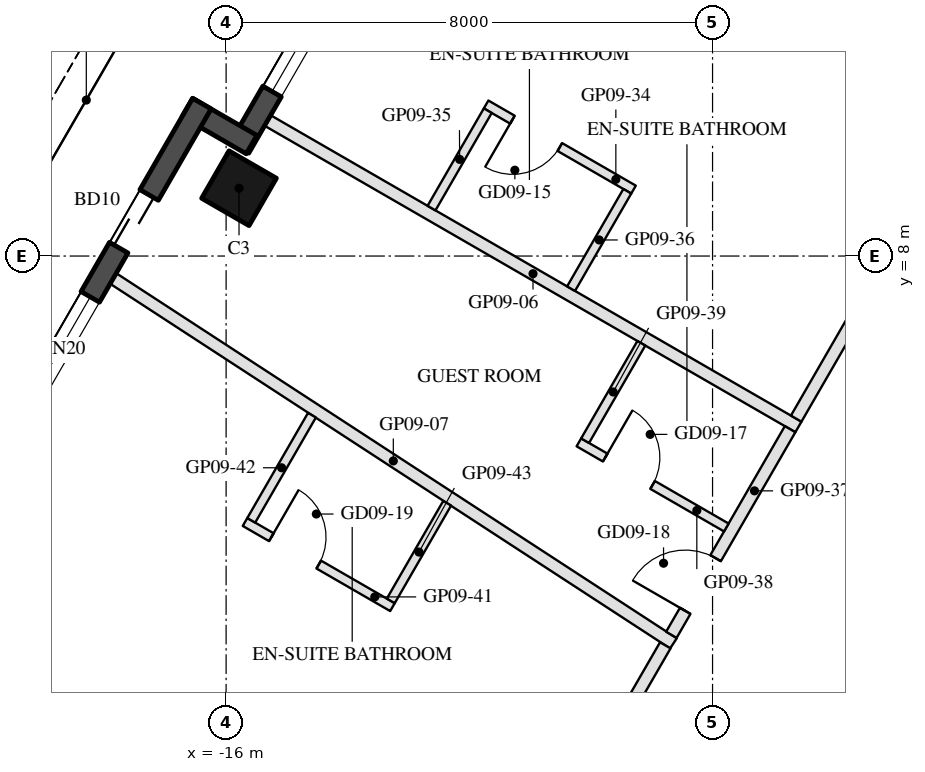
"""IFC4 building model, lengths in metres.
Left out: names, types, materials, properties, quantities, classifications, styles, units other than length and angle.
Written with IfcOpenShell. Run it as: python <this file> out.ifc"""

import sys

from ifc_helpers import new_model, si_unit, direction, frame, frame_2d, origin, origin_2d, place, context, subcontext, project, spatial, rectangle, hollow_rectangle, extrude, element, fill, save


model = new_model("IFC4")
c1 = context("Model", 3, precision=1e-05, world=origin(), true_north=direction((0.0, 1.0)))
c2 = subcontext(c1, "Body", "Model", "MODEL_VIEW")
j1 = project(units=[si_unit("LENGTHUNIT", "METRE"), si_unit("PLANEANGLEUNIT", "RADIAN")], contexts=[c1])
p1 = place(None, origin())
s1 = spatial("IfcSite", under=j1, at=p1, CompositionType="ELEMENT")
p2 = place(p1, origin())
s2 = spatial("IfcBuilding", under=s1, at=p2, CompositionType="ELEMENT")
p3 = place(p2, frame((0.0, 0.0, 109.4)))
s3 = spatial("IfcBuildingStorey", under=s2, at=p3, CompositionType="ELEMENT", Elevation=109.4)
p4 = place(p3, frame((-15.788, 9.115, 0.0), z_axis=(0.0, 0.0, 1.0), x_axis=(0.5, 0.866025403784, 0.0)))
e1 = element("IfcColumn", 1, at=p4, inside=s3, PredefinedType="COLUMN", context=c2, shape_type="SweptSolid", body=[
    extrude(hollow_rectangle(XDim=0.9, YDim=0.9, WallThickness=0.04, at=origin_2d()), origin(), (0.0, 0.0, 1.0), 3.7),
])
p5 = place(p3, frame((-12.409, 15.617, 0.0), z_axis=(0.0, 0.0, 1.0), x_axis=(-0.500003597184, -0.866023326939, 0.0)))
e2 = element("IfcWall", 2, at=p5, inside=s3, PredefinedType="SOLIDWALL", context=c2, shape_type="SweptSolid", body=[
    extrude(rectangle(XDim=6.74, YDim=0.35, at=frame_2d((3.37, 0.0))), origin(), (0.0, 0.0, 1.0), 3.55),
])
p6 = place(p5, frame((0.77, 0.0, 0.3)))
e3 = element("IfcOpeningElement", 3, at=p6, cuts=e2, PredefinedType="OPENING", context=c2, shape_type="SweptSolid", body=[
    extrude(rectangle(XDim=2.3, YDim=2.65, at=frame_2d((1.15, 1.325))), frame((0.0, 0.185, 0.0), z_axis=(0.0, -1.0, 0.0), x_axis=(1.0, 0.0, 0.0)), (0.0, 0.0, 1.0), 0.37),
])
p7 = place(p5, frame((3.37, 0.0, 0.3)))
e4 = element("IfcOpeningElement", 4, at=p7, cuts=e2, PredefinedType="OPENING", context=c2, shape_type="SweptSolid", body=[
    extrude(rectangle(XDim=2.3, YDim=2.65, at=frame_2d((1.15, 1.325))), frame((0.0, 0.185, 0.0), z_axis=(0.0, -1.0, 0.0), x_axis=(1.0, 0.0, 0.0)), (0.0, 0.0, 1.0), 0.37),
])
p8 = place(p3, frame((-15.581, 9.833, 0.0), z_axis=(0.0, 0.0, 1.0), x_axis=(-0.866055662726, 0.499947586314, 0.0)))
e5 = element("IfcWall", 5, at=p8, inside=s3, PredefinedType="SOLIDWALL", context=c2, shape_type="SweptSolid", body=[
    extrude(rectangle(XDim=1.22, YDim=0.35, at=frame_2d((0.61, 0.0))), origin(), (0.0, 0.0, 1.0), 3.55),
])
p9 = place(p3, frame((-16.398, 10.507, 0.0), z_axis=(0.0, 0.0, 1.0), x_axis=(-0.499999142773, -0.866025898704, 0.0)))
e6 = element("IfcWall", 6, at=p9, inside=s3, PredefinedType="SOLIDWALL", context=c2, shape_type="SweptSolid", body=[
    extrude(rectangle(XDim=9.7, YDim=0.35, at=frame_2d((4.85, 0.0))), origin(), (0.0, 0.0, 1.0), 3.55),
])
p10 = place(p9, frame((1.735, 0.0, 0.0)))
e7 = element("IfcOpeningElement", 7, at=p10, cuts=e6, PredefinedType="OPENING", context=c2, shape_type="SweptSolid", body=[
    extrude(rectangle(XDim=1.0, YDim=2.4, at=frame_2d((0.5, 1.2))), frame((0.0, 0.185, 0.0), z_axis=(0.0, -1.0, 0.0), x_axis=(1.0, 0.0, 0.0)), (0.0, 0.0, 1.0), 0.37),
])
p11 = place(p9, frame((3.67, 0.0, 0.3)))
e8 = element("IfcOpeningElement", 8, at=p11, cuts=e6, PredefinedType="OPENING", context=c2, shape_type="SweptSolid", body=[
    extrude(rectangle(XDim=2.0, YDim=2.65, at=frame_2d((1.0, 1.325))), frame((0.0, 0.185, 0.0), z_axis=(0.0, -1.0, 0.0), x_axis=(1.0, 0.0, 0.0)), (0.0, 0.0, 1.0), 0.37),
])
p12 = place(p9, frame((5.97, 0.0, 0.3)))
e9 = element("IfcOpeningElement", 9, at=p12, cuts=e6, PredefinedType="OPENING", context=c2, shape_type="SweptSolid", body=[
    extrude(rectangle(XDim=2.0, YDim=2.65, at=frame_2d((1.0, 1.325))), frame((0.0, 0.185, 0.0), z_axis=(0.0, -1.0, 0.0), x_axis=(1.0, 0.0, 0.0)), (0.0, 0.0, 1.0), 0.37),
])
p13 = place(p3, frame((-15.317, 10.229, 0.0), z_axis=(0.0, 0.0, 1.0), x_axis=(0.866022637375, -0.500004791531, 0.0)))
e10 = element("IfcWall", 10, at=p13, inside=s3, PredefinedType="PARTITIONING", context=c2, shape_type="SweptSolid", body=[
    extrude(rectangle(XDim=10.08, YDim=0.2, at=frame_2d((5.04, 0.0))), origin(), (0.0, 0.0, 1.0), 2.96),
])
p14 = place(p3, frame((-17.857, 7.631, 0.0), z_axis=(0.0, 0.0, 1.0), x_axis=(0.837909060234, -0.545809863211, 0.0)))
e11 = element("IfcWall", 11, at=p14, inside=s3, PredefinedType="PARTITIONING", context=c2, shape_type="SweptSolid", body=[
    extrude(rectangle(XDim=10.996, YDim=0.2, at=frame_2d((5.498, 0.0))), origin(), (0.0, 0.0, 1.0), 2.96),
])
p15 = place(p3, frame((-6.625, 5.326, 0.0), z_axis=(0.0, 0.0, 1.0), x_axis=(0.499980288617, 0.866036783858, 0.0)))
e12 = element("IfcWall", 12, at=p15, inside=s3, PredefinedType="PARTITIONING", context=c2, shape_type="SweptSolid", body=[
    extrude(rectangle(XDim=8.688, YDim=0.2, at=frame_2d((4.344, 0.0))), origin(), (0.0, 0.0, 1.0), 2.95),
])
p16 = place(p15, frame((3.844, 0.0, 0.0)))
e13 = element("IfcOpeningElement", 13, at=p16, cuts=e12, PredefinedType="OPENING", context=c2, shape_type="SweptSolid", body=[
    extrude(rectangle(XDim=1.0, YDim=2.1, at=frame_2d((0.5, 1.05))), frame((0.0, 0.11, 0.0), z_axis=(0.0, -1.0, 0.0), x_axis=(1.0, 0.0, 0.0)), (0.0, 0.0, 1.0), 0.22),
])
p17 = place(p3, frame((-9.299, 9.093, 0.0), z_axis=(0.0, 0.0, 1.0), x_axis=(-0.866056369097, 0.49994636267, 0.0)))
e14 = element("IfcWall", 14, at=p17, inside=s3, PredefinedType="PARTITIONING", context=c2, shape_type="SweptSolid", body=[
    extrude(rectangle(XDim=2.8, YDim=0.15, at=frame_2d((1.4, 0.0))), origin(), (0.0, 0.0, 1.0), 3.55),
])
p18 = place(p17, frame((1.4, 0.0, 0.0)))
e15 = element("IfcOpeningElement", 15, at=p18, cuts=e14, PredefinedType="OPENING", context=c2, shape_type="SweptSolid", body=[
    extrude(rectangle(XDim=0.9, YDim=2.1, at=frame_2d((0.45, 1.05))), frame((0.0, 0.085, 0.0), z_axis=(0.0, -1.0, 0.0), x_axis=(1.0, 0.0, 0.0)), (0.0, 0.0, 1.0), 0.17),
])
for number, where, z_axis, x_axis in (
    (16, (-11.697, 10.39, 0.0), (0.0, 0.0, 1.0), (-0.5, -0.866, 0.0)),
    (17, (-9.402, 9.065, 0.0), (0.0, 0.0, 1.0), (-0.5, -0.866, 0.0)),
):
    element("IfcWall", number, at=place(p3, frame(where, z_axis=z_axis, x_axis=x_axis)), inside=s3, PredefinedType="PARTITIONING", context=c2, shape_type="SweptSolid", body=[
        extrude(rectangle(XDim=1.85, YDim=0.15, at=frame_2d((0.925, 0.0))), origin(), (0.0, 0.0, 1.0), 3.55),
    ])
p19 = place(p3, frame((-8.677, 1.771, 0.0), z_axis=(0.0, 0.0, 1.0), x_axis=(0.499998439657, 0.866026304647, 0.0)))
e18 = element("IfcWall", 18, at=p19, inside=s3, PredefinedType="PARTITIONING", context=c2, shape_type="SweptSolid", body=[
    extrude(rectangle(XDim=3.905, YDim=0.2, at=frame_2d((1.953, 0.0))), origin(), (0.0, 0.0, 1.0), 2.95),
])
p20 = place(p19, frame((0.455, 0.0, 0.0)))
e19 = element("IfcOpeningElement", 19, at=p20, cuts=e18, PredefinedType="OPENING", context=c2, shape_type="SweptSolid", body=[
    extrude(rectangle(XDim=1.0, YDim=2.1, at=frame_2d((0.5, 1.05))), frame((0.0, 0.11, 0.0), z_axis=(0.0, -1.0, 0.0), x_axis=(1.0, 0.0, 0.0)), (0.0, 0.0, 1.0), 0.22),
])
p21 = place(p3, frame((-10.198, 4.936, 0.0), z_axis=(0.0, 0.0, 1.0), x_axis=(0.865996816683, -0.500049511043, 0.0)))
e20 = element("IfcWall", 20, at=p21, inside=s3, PredefinedType="PARTITIONING", context=c2, shape_type="SweptSolid", body=[
    extrude(rectangle(XDim=2.8, YDim=0.15, at=frame_2d((1.4, 0.0))), origin(), (0.0, 0.0, 1.0), 3.55),
])
p22 = place(p21, frame((0.5, 0.0, 0.0)))
e21 = element("IfcOpeningElement", 21, at=p22, cuts=e20, PredefinedType="OPENING", context=c2, shape_type="SweptSolid", body=[
    extrude(rectangle(XDim=0.9, YDim=2.1, at=frame_2d((0.45, 1.05))), frame((0.0, 0.085, 0.0), z_axis=(0.0, -1.0, 0.0), x_axis=(1.0, 0.0, 0.0)), (0.0, 0.0, 1.0), 0.17),
])
p23 = place(p3, frame((-9.171, 6.565, 0.0), z_axis=(0.0, 0.0, 1.0), x_axis=(-0.499985172903, -0.866033964044, 0.0)))
e22 = element("IfcWall", 22, at=p23, inside=s3, PredefinedType="PARTITIONING", context=c2, shape_type="SweptSolid", body=[
    extrude(rectangle(XDim=1.85, YDim=0.15, at=frame_2d((0.925, 0.0))), origin(), (0.0, 0.0, 1.0), 2.95),
])
p24 = place(p3, frame((-12.269, -4.45, 0.0), z_axis=(0.0, 0.0, 1.0), x_axis=(0.500016026819, 0.866016150498, 0.0)))
e23 = element("IfcWall", 23, at=p24, inside=s3, PredefinedType="PARTITIONING", context=c2, shape_type="SweptSolid", body=[
    extrude(rectangle(XDim=6.983, YDim=0.2, at=frame_2d((3.491, 0.0))), origin(), (0.0, 0.0, 1.0), 2.95),
])
p25 = place(p24, frame((2.991, 0.0, 0.0)))
e24 = element("IfcOpeningElement", 24, at=p25, cuts=e23, PredefinedType="OPENING", context=c2, shape_type="SweptSolid", body=[
    extrude(rectangle(XDim=1.0, YDim=2.1, at=frame_2d((0.5, 1.05))), frame((0.0, 0.11, 0.0), z_axis=(0.0, -1.0, 0.0), x_axis=(1.0, 0.0, 0.0)), (0.0, 0.0, 1.0), 0.22),
])
p26 = place(p3, frame((-15.689, 3.626, 0.0), z_axis=(0.0, 0.0, 1.0), x_axis=(0.866018616679, -0.500011755427, 0.0)))
e25 = element("IfcWall", 25, at=p26, inside=s3, PredefinedType="PARTITIONING", context=c2, shape_type="SweptSolid", body=[
    extrude(rectangle(XDim=2.8, YDim=0.15, at=frame_2d((1.4, 0.0))), origin(), (0.0, 0.0, 1.0), 3.55),
])
p27 = place(p26, frame((0.5, 0.0, 0.0)))
e26 = element("IfcOpeningElement", 26, at=p27, cuts=e25, PredefinedType="OPENING", context=c2, shape_type="SweptSolid", body=[
    extrude(rectangle(XDim=0.9, YDim=2.1, at=frame_2d((0.45, 1.05))), frame((0.0, 0.085, 0.0), z_axis=(0.0, -1.0, 0.0), x_axis=(1.0, 0.0, 0.0)), (0.0, 0.0, 1.0), 0.17),
])
p28 = place(p3, frame((-14.588, 5.382, 0.0), z_axis=(0.0, 0.0, 1.0), x_axis=(-0.500018837128, -0.86601452789, 0.0)))
e27 = element("IfcWall", 27, at=p28, inside=s3, PredefinedType="PARTITIONING", context=c2, shape_type="SweptSolid", body=[
    extrude(rectangle(XDim=1.997, YDim=0.15, at=frame_2d((0.998, 0.0))), origin(), (0.0, 0.0, 1.0), 2.95),
])
p29 = place(p3, frame((-12.365, 3.934, 0.0), z_axis=(0.0, 0.0, 1.0), x_axis=(-0.4999770169, -0.866038672677, 0.0)))
e28 = element("IfcWall", 28, at=p29, inside=s3, PredefinedType="PARTITIONING", context=c2, shape_type="SweptSolid", body=[
    extrude(rectangle(XDim=1.854, YDim=0.15, at=frame_2d((0.927, 0.0))), origin(), (0.0, 0.0, 1.0), 2.95),
])
p30 = place(p7, origin())
e29 = element("IfcWindow", 29, at=p30, inside=s3, PartitioningType="SINGLE_PANEL", PredefinedType="WINDOW", context=c2, shape_type="SweptSolid", body=[
    extrude(rectangle(XDim=2.3, YDim=2.65, at=frame_2d((1.15, 1.325))), frame((0.0, 0.03, 0.0), z_axis=(0.0, -1.0, 0.0), x_axis=(1.0, 0.0, 0.0)), (0.0, 0.0, 1.0), 0.06),
])
fill(e4, e29)
p31 = place(p10, frame((1.0, 0.0, 0.0), z_axis=(0.0, 0.0, 1.0), x_axis=(-1.0, 0.0, 0.0)))
e30 = element("IfcDoor", 30, at=p31, inside=s3, OperationType="SLIDING_TO_LEFT", PredefinedType="DOOR", context=c2, shape_type="SweptSolid", body=[
    extrude(rectangle(XDim=1.0, YDim=2.4, at=frame_2d((0.5, 1.2))), frame((0.0, 0.025, 0.0), z_axis=(0.0, -1.0, 0.0), x_axis=(1.0, 0.0, 0.0)), (0.0, 0.0, 1.0), 0.05),
])
fill(e7, e30)
p32 = place(p11, origin())
e31 = element("IfcWindow", 31, at=p32, inside=s3, PartitioningType="SINGLE_PANEL", PredefinedType="WINDOW", context=c2, shape_type="SweptSolid", body=[
    extrude(rectangle(XDim=2.0, YDim=2.65, at=frame_2d((1.0, 1.325))), frame((0.0, 0.03, 0.0), z_axis=(0.0, -1.0, 0.0), x_axis=(1.0, 0.0, 0.0)), (0.0, 0.0, 1.0), 0.06),
])
fill(e8, e31)
p33 = place(p18, origin())
e32 = element("IfcDoor", 32, at=p33, inside=s3, OperationType="SINGLE_SWING_RIGHT", PredefinedType="DOOR", context=c2, shape_type="SweptSolid", body=[
    extrude(rectangle(XDim=0.9, YDim=2.1, at=frame_2d((0.45, 1.05))), frame((0.0, 0.025, 0.0), z_axis=(0.0, -1.0, 0.0), x_axis=(1.0, 0.0, 0.0)), (0.0, 0.0, 1.0), 0.05),
])
fill(e15, e32)
p34 = place(p22, origin())
e33 = element("IfcDoor", 33, at=p34, inside=s3, OperationType="SINGLE_SWING_LEFT", PredefinedType="DOOR", context=c2, shape_type="SweptSolid", body=[
    extrude(rectangle(XDim=0.9, YDim=2.1, at=frame_2d((0.45, 1.05))), frame((0.0, 0.025, 0.0), z_axis=(0.0, -1.0, 0.0), x_axis=(1.0, 0.0, 0.0)), (0.0, 0.0, 1.0), 0.05),
])
fill(e21, e33)
p35 = place(p20, origin())
e34 = element("IfcDoor", 34, at=p35, inside=s3, OperationType="SINGLE_SWING_LEFT", PredefinedType="DOOR", context=c2, shape_type="SweptSolid", body=[
    extrude(rectangle(XDim=1.0, YDim=2.1, at=frame_2d((0.5, 1.05))), frame((0.0, 0.025, 0.0), z_axis=(0.0, -1.0, 0.0), x_axis=(1.0, 0.0, 0.0)), (0.0, 0.0, 1.0), 0.05),
])
fill(e19, e34)
p36 = place(p27, origin())
e35 = element("IfcDoor", 35, at=p36, inside=s3, OperationType="SINGLE_SWING_LEFT", PredefinedType="DOOR", context=c2, shape_type="SweptSolid", body=[
    extrude(rectangle(XDim=0.9, YDim=2.1, at=frame_2d((0.45, 1.05))), frame((0.0, 0.025, 0.0), z_axis=(0.0, -1.0, 0.0), x_axis=(1.0, 0.0, 0.0)), (0.0, 0.0, 1.0), 0.05),
])
fill(e26, e35)
save(model, sys.argv[1])
